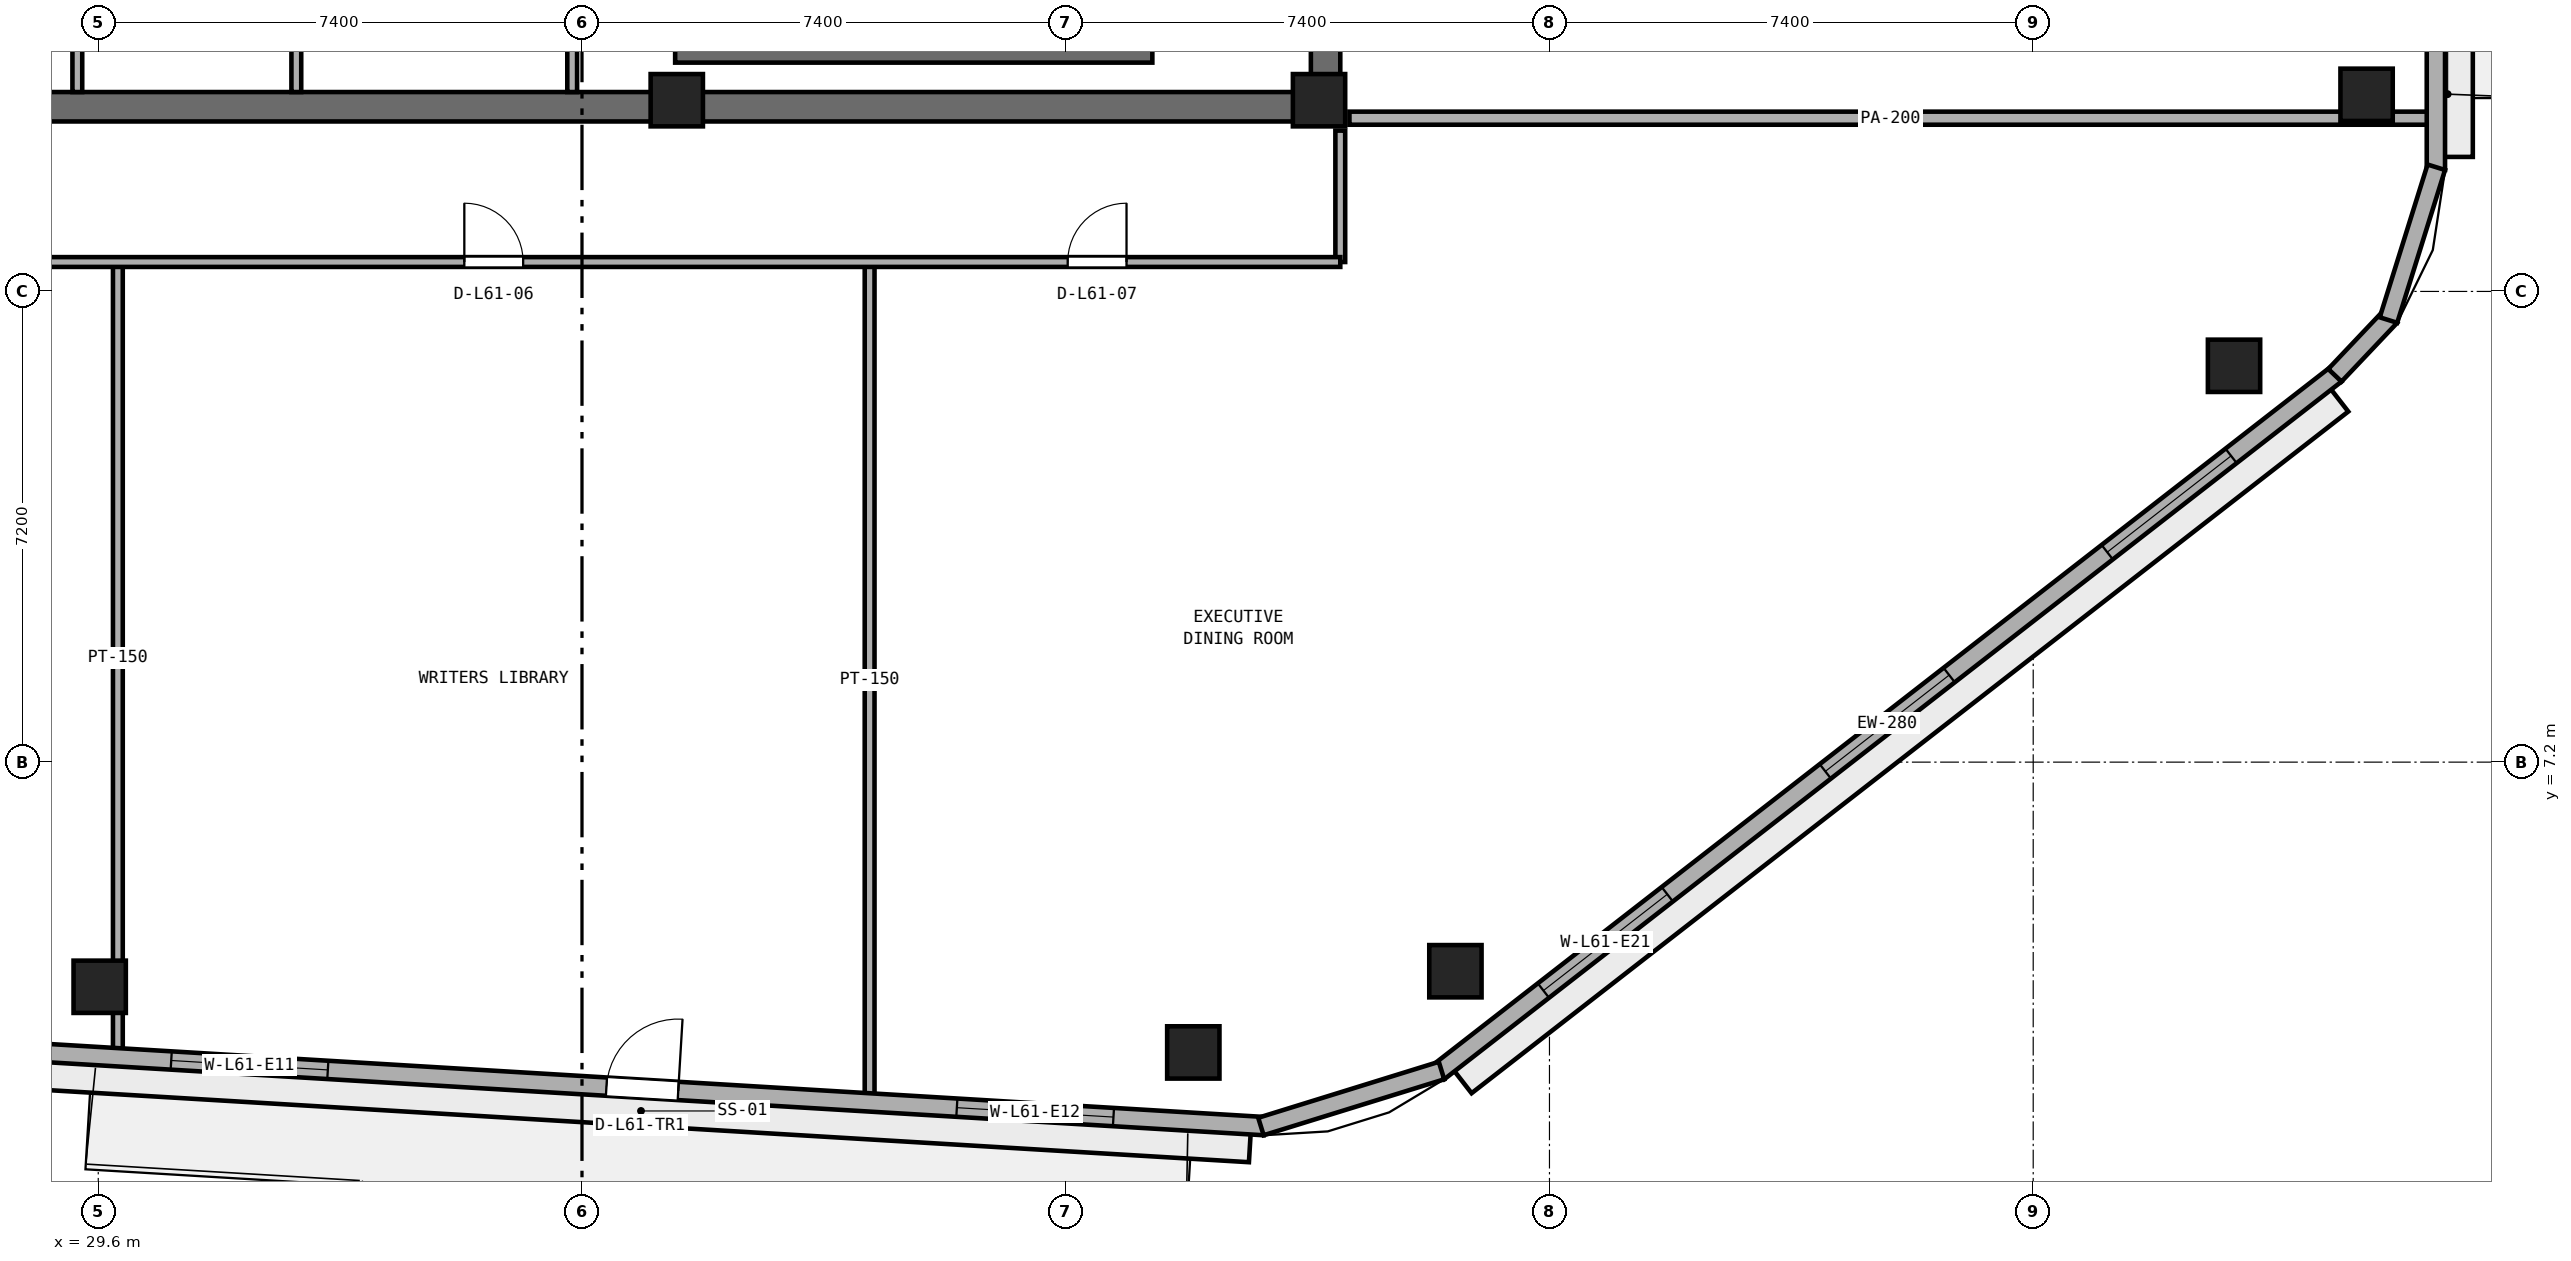
"""IFC4 building model, lengths in metres.
Left out: names, types, materials, properties, quantities, classifications, styles, units other than length and angle.
Written with IfcOpenShell. Run it as: python <this file> out.ifc"""

import sys

from ifc_helpers import new_model, si_unit, direction, frame, frame_2d, origin, origin_2d, place, context, subcontext, project, spatial, rectangle, extrude, element, fill, save


model = new_model("IFC4")
c1 = context("Model", 3, precision=1e-05, world=origin(), true_north=direction((0.0, 1.0)))
c2 = subcontext(c1, "Body", "Model", "MODEL_VIEW")
j1 = project(units=[si_unit("LENGTHUNIT", "METRE"), si_unit("PLANEANGLEUNIT", "RADIAN")], contexts=[c1])
p1 = place(None, origin())
s1 = spatial("IfcSite", under=j1, at=p1, CompositionType="ELEMENT")
p2 = place(p1, origin())
s2 = spatial("IfcBuilding", under=s1, at=p2, CompositionType="ELEMENT")
p3 = place(p2, frame((0.0, 0.0, 240.2)))
s3 = spatial("IfcBuildingStorey", under=s2, at=p3, CompositionType="ELEMENT", Elevation=240.2)
p4 = place(p3, frame((25.4, 17.225, 0.0), z_axis=(0.0, 0.0, 1.0), x_axis=(1.0, 0.0, 0.0)))
e1 = element("IfcWall", 1, at=p4, inside=s3, PredefinedType="SHEAR", context=c2, shape_type="SweptSolid", body=[
    extrude(rectangle(XDim=23.2, YDim=0.45, at=frame_2d((11.6, 0.0))), origin(), (0.0, 0.0, 1.0), 3.51),
])
p5 = place(p3, frame((48.375, 17.45, 0.0), z_axis=(0.0, 0.0, 1.0), x_axis=(0.0, 1.0, 0.0)))
e2 = element("IfcWall", 2, at=p5, inside=s3, PredefinedType="SHEAR", context=c2, shape_type="SweptSolid", body=[
    extrude(rectangle(XDim=15.5, YDim=0.45, at=frame_2d((7.75, 0.0))), origin(), (0.0, 0.0, 1.0), 3.51),
])
p6 = place(p5, frame((5.85, 0.0, 0.0)))
e3 = element("IfcOpeningElement", 3, at=p6, cuts=e2, PredefinedType="OPENING", context=c2, shape_type="SweptSolid", body=[
    extrude(rectangle(XDim=1.5, YDim=2.15, at=frame_2d((0.75, 1.075))), frame((0.0, 0.235, 0.0), z_axis=(0.0, -1.0, 0.0), x_axis=(1.0, 0.0, 0.0)), (0.0, 0.0, 1.0), 0.47),
])
for number, where, z_axis, x_axis in (
    (4, (38.45, 17.325, 0.0), (0.0, 0.0, 1.0), (1.0, 0.0, 0.0)),
    (5, (48.275, 17.325, 0.0), (0.0, 0.0, 1.0), (1.0, 0.0, 0.0)),
):
    element("IfcColumn", number, at=place(p3, frame(where, z_axis=z_axis, x_axis=x_axis)), inside=s3, PredefinedType="PILASTER", context=c2, shape_type="SweptSolid", body=[
        extrude(rectangle(XDim=0.8, YDim=0.8, at=origin_2d()), origin(), (0.0, 0.0, 1.0), 3.8),
    ])
for number, where, z_axis, x_axis in (
    (6, (29.622, 3.764, 0.0), (0.0, 0.0, 1.0), (1.0, 0.0, 0.0)),
    (7, (46.352, 2.76, 0.0), (0.0, 0.0, 1.0), (1.0, 0.0, 0.0)),
    (8, (50.361, 4.002, 0.0), (0.0, 0.0, 1.0), (1.0, 0.0, 0.0)),
    (9, (62.272, 13.262, 0.0), (0.0, 0.0, 1.0), (1.0, 0.0, 0.0)),
    (10, (64.3, 17.408, 0.0), (0.0, 0.0, 1.0), (1.0, 0.0, 0.0)),
):
    element("IfcColumn", number, at=place(p3, frame(where, z_axis=z_axis, x_axis=x_axis)), inside=s3, PredefinedType="COLUMN", context=c2, shape_type="SweptSolid", body=[
        extrude(rectangle(XDim=0.8, YDim=0.8, at=origin_2d()), origin(), (0.0, 0.0, 1.0), 3.8),
    ])
p7 = place(p3, frame((38.425, 18.025, 0.0), z_axis=(0.0, 0.0, 1.0), x_axis=(1.0, 0.0, 0.0)))
e11 = element("IfcWall", 11, at=p7, inside=s3, PredefinedType="SHEAR", context=c2, shape_type="SweptSolid", body=[
    extrude(rectangle(XDim=7.3, YDim=0.25, at=frame_2d((3.65, 0.0))), origin(), (0.0, 0.0, 1.0), 3.51),
])
for number, where, z_axis, x_axis in (
    (12, (29.28, 17.45, 0.0), (0.0, 0.0, 1.0), (0.0, 1.0, 0.0)),
    (13, (32.63, 17.45, 0.0), (0.0, 0.0, 1.0), (0.0, 1.0, 0.0)),
    (14, (36.85, 17.45, 0.0), (0.0, 0.0, 1.0), (0.0, 1.0, 0.0)),
):
    element("IfcWall", number, at=place(p3, frame(where, z_axis=z_axis, x_axis=x_axis)), inside=s3, PredefinedType="PARTITIONING", context=c2, shape_type="SweptSolid", body=[
        extrude(rectangle(XDim=2.3, YDim=0.15, at=frame_2d((1.15, 0.0))), origin(), (0.0, 0.0, 1.0), 3.51),
    ])
p8 = place(p3, frame((48.6, 14.85, 0.0), z_axis=(0.0, 0.0, 1.0), x_axis=(0.0, 1.0, 0.0)))
e15 = element("IfcWall", 15, at=p8, inside=s3, PredefinedType="PARTITIONING", context=c2, shape_type="SweptSolid", body=[
    extrude(rectangle(XDim=2.01, YDim=0.15, at=frame_2d((1.005, 0.0))), origin(), (0.0, 0.0, 1.0), 2.893),
])
p9 = place(p3, frame((41.4, 2.06, 0.0), z_axis=(0.0, 0.0, 1.0), x_axis=(0.0, 1.0, 0.0)))
e16 = element("IfcWall", 16, at=p9, inside=s3, PredefinedType="PARTITIONING", context=c2, shape_type="SweptSolid", body=[
    extrude(rectangle(XDim=12.791, YDim=0.15, at=frame_2d((6.395, 0.0))), origin(), (0.0, 0.0, 1.0), 3.51),
])
p10 = place(p3, frame((29.9, 2.75, 0.0), z_axis=(0.0, 0.0, 1.0), x_axis=(0.0, 1.0, 0.0)))
e17 = element("IfcWall", 17, at=p10, inside=s3, PredefinedType="PARTITIONING", context=c2, shape_type="SweptSolid", body=[
    extrude(rectangle(XDim=12.1, YDim=0.15, at=frame_2d((6.05, 0.0))), origin(), (0.0, 0.0, 1.0), 3.51),
])
p11 = place(p3, frame((23.25, 14.85, 0.0), z_axis=(0.0, 0.0, 1.0), x_axis=(1.0, 0.0, 0.0)))
e18 = element("IfcWall", 18, at=p11, inside=s3, PredefinedType="PARTITIONING", context=c2, shape_type="SweptSolid", body=[
    extrude(rectangle(XDim=25.35, YDim=0.15, at=frame_2d((12.675, 0.0))), origin(), (0.0, 0.0, 1.0), 3.51),
])
p12 = place(p11, frame((2.995, 0.0, 0.0)))
e19 = element("IfcOpeningElement", 19, at=p12, cuts=e18, PredefinedType="OPENING", context=c2, shape_type="SweptSolid", body=[
    extrude(rectangle(XDim=0.9, YDim=2.1, at=frame_2d((0.45, 1.05))), frame((0.0, 0.085, 0.0), z_axis=(0.0, -1.0, 0.0), x_axis=(1.0, 0.0, 0.0)), (0.0, 0.0, 1.0), 0.17),
])
p13 = place(p11, frame((11.95, 0.0, 0.0)))
e20 = element("IfcOpeningElement", 20, at=p13, cuts=e18, PredefinedType="OPENING", context=c2, shape_type="SweptSolid", body=[
    extrude(rectangle(XDim=0.9, YDim=2.1, at=frame_2d((0.45, 1.05))), frame((0.0, 0.085, 0.0), z_axis=(0.0, -1.0, 0.0), x_axis=(1.0, 0.0, 0.0)), (0.0, 0.0, 1.0), 0.17),
])
p14 = place(p11, frame((21.18, 0.0, 0.0)))
e21 = element("IfcOpeningElement", 21, at=p14, cuts=e18, PredefinedType="OPENING", context=c2, shape_type="SweptSolid", body=[
    extrude(rectangle(XDim=0.9, YDim=2.1, at=frame_2d((0.45, 1.05))), frame((0.0, 0.085, 0.0), z_axis=(0.0, -1.0, 0.0), x_axis=(1.0, 0.0, 0.0)), (0.0, 0.0, 1.0), 0.17),
])
p15 = place(p3, frame((48.74, 17.05, 0.0), z_axis=(0.0, 0.0, 1.0), x_axis=(1.0, 0.0, 0.0)))
e22 = element("IfcWall", 22, at=p15, inside=s3, PredefinedType="PARTITIONING", context=c2, shape_type="SweptSolid", body=[
    extrude(rectangle(XDim=16.555, YDim=0.2, at=frame_2d((8.277, 0.0))), origin(), (0.0, 0.0, 1.0), 2.893),
])
p16 = place(p3, frame((28.411, 2.774, 0.0), z_axis=(0.0, 0.0, 1.0), x_axis=(0.998203068368, -0.059921901676, 0.0)))
e23 = element("IfcWall", 23, at=p16, inside=s3, PredefinedType="STANDARD", context=c2, shape_type="SweptSolid", body=[
    extrude(rectangle(XDim=19.06, YDim=0.28, at=frame_2d((9.53, 0.0))), origin(), (0.0, 0.0, 1.0), 3.51),
])
p17 = place(p16, frame((8.98, 0.0, 0.0)))
e24 = element("IfcOpeningElement", 24, at=p17, cuts=e23, PredefinedType="OPENING", context=c2, shape_type="SweptSolid", body=[
    extrude(rectangle(XDim=1.1, YDim=2.2, at=frame_2d((0.55, 1.1))), frame((0.0, 0.15, 0.0), z_axis=(0.0, -1.0, 0.0), x_axis=(1.0, 0.0, 0.0)), (0.0, 0.0, 1.0), 0.3),
])
p18 = place(p16, frame((2.31, 0.0, 0.9)))
e25 = element("IfcOpeningElement", 25, at=p18, cuts=e23, PredefinedType="OPENING", context=c2, shape_type="SweptSolid", body=[
    extrude(rectangle(XDim=2.4, YDim=1.75, at=frame_2d((1.2, 0.875))), frame((0.0, 0.15, 0.0), z_axis=(0.0, -1.0, 0.0), x_axis=(1.0, 0.0, 0.0)), (0.0, 0.0, 1.0), 0.3),
])
p19 = place(p16, frame((14.35, 0.0, 0.9)))
e26 = element("IfcOpeningElement", 26, at=p19, cuts=e23, PredefinedType="OPENING", context=c2, shape_type="SweptSolid", body=[
    extrude(rectangle(XDim=2.4, YDim=1.75, at=frame_2d((1.2, 0.875))), frame((0.0, 0.15, 0.0), z_axis=(0.0, -1.0, 0.0), x_axis=(1.0, 0.0, 0.0)), (0.0, 0.0, 1.0), 0.3),
])
p20 = place(p3, frame((50.104, 2.459, 0.0), z_axis=(0.0, 0.0, 1.0), x_axis=(0.789464857485, 0.613795763097, 0.0)))
e27 = element("IfcWall", 27, at=p20, inside=s3, PredefinedType="STANDARD", context=c2, shape_type="SweptSolid", body=[
    extrude(rectangle(XDim=17.387, YDim=0.28, at=frame_2d((8.694, 0.0))), origin(), (0.0, 0.0, 1.0), 3.51),
])
p21 = place(p20, frame((2.031, 0.0, 0.9)))
e28 = element("IfcOpeningElement", 28, at=p21, cuts=e27, PredefinedType="OPENING", context=c2, shape_type="SweptSolid", body=[
    extrude(rectangle(XDim=2.4, YDim=1.75, at=frame_2d((1.2, 0.875))), frame((0.0, 0.15, 0.0), z_axis=(0.0, -1.0, 0.0), x_axis=(1.0, 0.0, 0.0)), (0.0, 0.0, 1.0), 0.3),
])
p22 = place(p20, frame((7.494, 0.0, 0.9)))
e29 = element("IfcOpeningElement", 29, at=p22, cuts=e27, PredefinedType="OPENING", context=c2, shape_type="SweptSolid", body=[
    extrude(rectangle(XDim=2.4, YDim=1.75, at=frame_2d((1.2, 0.875))), frame((0.0, 0.15, 0.0), z_axis=(0.0, -1.0, 0.0), x_axis=(1.0, 0.0, 0.0)), (0.0, 0.0, 1.0), 0.3),
])
p23 = place(p20, frame((12.956, 0.0, 0.9)))
e30 = element("IfcOpeningElement", 30, at=p23, cuts=e27, PredefinedType="OPENING", context=c2, shape_type="SweptSolid", body=[
    extrude(rectangle(XDim=2.4, YDim=1.75, at=frame_2d((1.2, 0.875))), frame((0.0, 0.15, 0.0), z_axis=(0.0, -1.0, 0.0), x_axis=(1.0, 0.0, 0.0)), (0.0, 0.0, 1.0), 0.3),
])
p24 = place(p3, frame((65.36, 16.258, 0.0), z_axis=(0.0, 0.0, 1.0), x_axis=(0.0, 1.0, 0.0)))
e31 = element("IfcWall", 31, at=p24, inside=s3, PredefinedType="STANDARD", context=c2, shape_type="SweptSolid", body=[
    extrude(rectangle(XDim=19.168, YDim=0.28, at=frame_2d((9.584, 0.0))), origin(), (0.0, 0.0, 1.0), 3.51),
])
p25 = place(p24, frame((9.034, 0.0, 0.0)))
e32 = element("IfcOpeningElement", 32, at=p25, cuts=e31, PredefinedType="OPENING", context=c2, shape_type="SweptSolid", body=[
    extrude(rectangle(XDim=1.1, YDim=2.2, at=frame_2d((0.55, 1.1))), frame((0.0, 0.15, 0.0), z_axis=(0.0, -1.0, 0.0), x_axis=(1.0, 0.0, 0.0)), (0.0, 0.0, 1.0), 0.3),
])
p26 = place(p24, frame((2.328, 0.0, 0.9)))
e33 = element("IfcOpeningElement", 33, at=p26, cuts=e31, PredefinedType="OPENING", context=c2, shape_type="SweptSolid", body=[
    extrude(rectangle(XDim=2.4, YDim=1.75, at=frame_2d((1.2, 0.875))), frame((0.0, 0.15, 0.0), z_axis=(0.0, -1.0, 0.0), x_axis=(1.0, 0.0, 0.0)), (0.0, 0.0, 1.0), 0.3),
])
p27 = place(p24, frame((14.19, 0.0, 0.9)))
e34 = element("IfcOpeningElement", 34, at=p27, cuts=e31, PredefinedType="OPENING", context=c2, shape_type="SweptSolid", body=[
    extrude(rectangle(XDim=2.4, YDim=1.75, at=frame_2d((1.2, 0.875))), frame((0.0, 0.15, 0.0), z_axis=(0.0, -1.0, 0.0), x_axis=(1.0, 0.0, 0.0)), (0.0, 0.0, 1.0), 0.3),
])
p28 = place(p3, frame((47.386, 1.626, 0.0), z_axis=(0.0, 0.0, 1.0), x_axis=(0.955189316149, 0.29599555793, 0.0)))
e35 = element("IfcWall", 35, at=p28, inside=s3, PredefinedType="STANDARD", context=c2, shape_type="SweptSolid", body=[
    extrude(rectangle(XDim=2.892, YDim=0.28, at=frame_2d((1.446, 0.0))), origin(), (0.0, 0.0, 1.0), 3.51),
])
p29 = place(p3, frame((63.815, 13.117, 0.0), z_axis=(0.0, 0.0, 1.0), x_axis=(0.687733716128, 0.725963040176, 0.0)))
e36 = element("IfcWall", 36, at=p29, inside=s3, PredefinedType="STANDARD", context=c2, shape_type="SweptSolid", body=[
    extrude(rectangle(XDim=1.239, YDim=0.28, at=frame_2d((0.62, 0.0))), origin(), (0.0, 0.0, 1.0), 3.51),
])
p30 = place(p3, frame((64.635, 13.962, 0.0), z_axis=(0.0, 0.0, 1.0), x_axis=(0.298649578722, 0.954362839348, 0.0)))
e37 = element("IfcWall", 37, at=p30, inside=s3, PredefinedType="STANDARD", context=c2, shape_type="SweptSolid", body=[
    extrude(rectangle(XDim=2.449, YDim=0.28, at=frame_2d((1.225, 0.0))), origin(), (0.0, 0.0, 1.0), 3.51),
])
p31 = place(p13, origin())
e38 = element("IfcDoor", 38, at=p31, inside=s3, OperationType="SINGLE_SWING_LEFT", PredefinedType="DOOR", context=c2, shape_type="SweptSolid", body=[
    extrude(rectangle(XDim=0.9, YDim=2.1, at=frame_2d((0.45, 1.05))), frame((0.0, 0.025, 0.0), z_axis=(0.0, -1.0, 0.0), x_axis=(1.0, 0.0, 0.0)), (0.0, 0.0, 1.0), 0.05),
])
fill(e20, e38)
p32 = place(p14, origin())
e39 = element("IfcDoor", 39, at=p32, inside=s3, OperationType="SINGLE_SWING_RIGHT", PredefinedType="DOOR", context=c2, shape_type="SweptSolid", body=[
    extrude(rectangle(XDim=0.9, YDim=2.1, at=frame_2d((0.45, 1.05))), frame((0.0, 0.025, 0.0), z_axis=(0.0, -1.0, 0.0), x_axis=(1.0, 0.0, 0.0)), (0.0, 0.0, 1.0), 0.05),
])
fill(e21, e39)
p33 = place(p17, origin())
e40 = element("IfcDoor", 40, at=p33, inside=s3, OperationType="SINGLE_SWING_RIGHT", PredefinedType="DOOR", context=c2, shape_type="SweptSolid", body=[
    extrude(rectangle(XDim=1.1, YDim=2.2, at=frame_2d((0.55, 1.1))), frame((0.0, 0.025, 0.0), z_axis=(0.0, -1.0, 0.0), x_axis=(1.0, 0.0, 0.0)), (0.0, 0.0, 1.0), 0.05),
])
fill(e24, e40)
p34 = place(p18, origin())
e41 = element("IfcWindow", 41, at=p34, inside=s3, PartitioningType="SINGLE_PANEL", PredefinedType="WINDOW", context=c2, shape_type="SweptSolid", body=[
    extrude(rectangle(XDim=2.4, YDim=1.75, at=frame_2d((1.2, 0.875))), frame((0.0, 0.03, 0.0), z_axis=(0.0, -1.0, 0.0), x_axis=(1.0, 0.0, 0.0)), (0.0, 0.0, 1.0), 0.06),
])
fill(e25, e41)
p35 = place(p19, origin())
e42 = element("IfcWindow", 42, at=p35, inside=s3, PartitioningType="SINGLE_PANEL", PredefinedType="WINDOW", context=c2, shape_type="SweptSolid", body=[
    extrude(rectangle(XDim=2.4, YDim=1.75, at=frame_2d((1.2, 0.875))), frame((0.0, 0.03, 0.0), z_axis=(0.0, -1.0, 0.0), x_axis=(1.0, 0.0, 0.0)), (0.0, 0.0, 1.0), 0.06),
])
fill(e26, e42)
p36 = place(p21, origin())
e43 = element("IfcWindow", 43, at=p36, inside=s3, PartitioningType="SINGLE_PANEL", PredefinedType="WINDOW", context=c2, shape_type="SweptSolid", body=[
    extrude(rectangle(XDim=2.4, YDim=1.75, at=frame_2d((1.2, 0.875))), frame((0.0, 0.03, 0.0), z_axis=(0.0, -1.0, 0.0), x_axis=(1.0, 0.0, 0.0)), (0.0, 0.0, 1.0), 0.06),
])
fill(e28, e43)
p37 = place(p22, origin())
e44 = element("IfcWindow", 44, at=p37, inside=s3, PartitioningType="SINGLE_PANEL", PredefinedType="WINDOW", context=c2, shape_type="SweptSolid", body=[
    extrude(rectangle(XDim=2.4, YDim=1.75, at=frame_2d((1.2, 0.875))), frame((0.0, 0.03, 0.0), z_axis=(0.0, -1.0, 0.0), x_axis=(1.0, 0.0, 0.0)), (0.0, 0.0, 1.0), 0.06),
])
fill(e29, e44)
p38 = place(p23, origin())
e45 = element("IfcWindow", 45, at=p38, inside=s3, PartitioningType="SINGLE_PANEL", PredefinedType="WINDOW", context=c2, shape_type="SweptSolid", body=[
    extrude(rectangle(XDim=2.4, YDim=1.75, at=frame_2d((1.2, 0.875))), frame((0.0, 0.03, 0.0), z_axis=(0.0, -1.0, 0.0), x_axis=(1.0, 0.0, 0.0)), (0.0, 0.0, 1.0), 0.06),
])
fill(e30, e45)
save(model, sys.argv[1])
